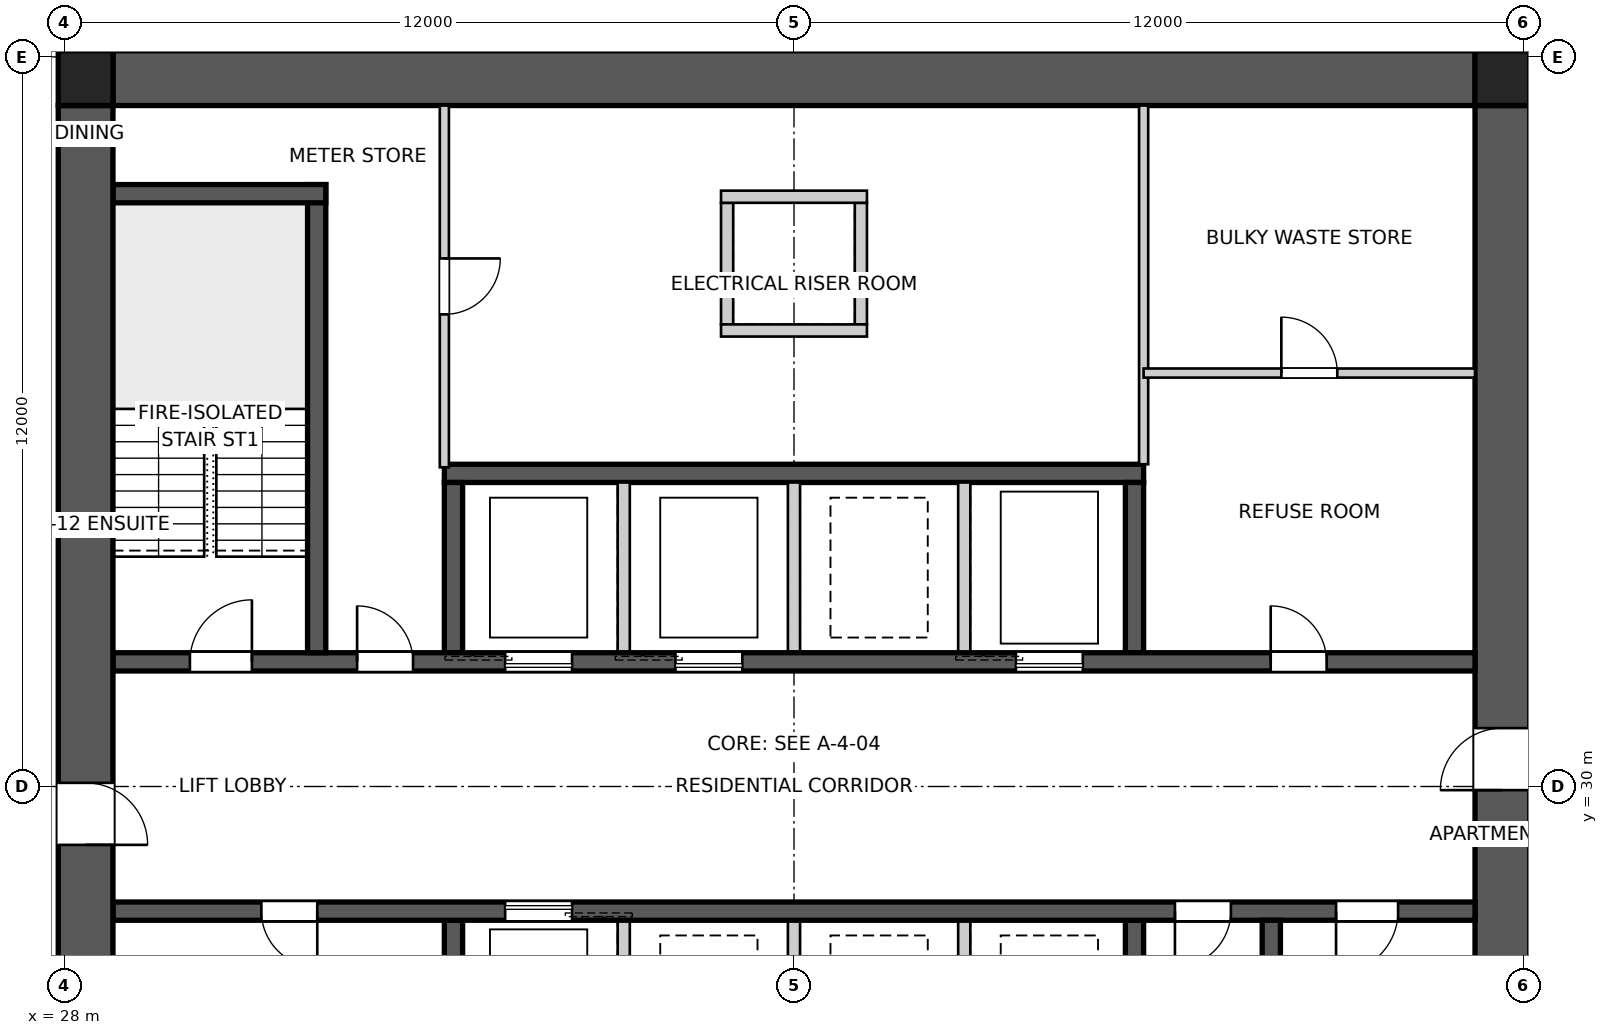
"""IFC4 building model, lengths in metres.
Left out: names, types, materials, properties, quantities, classifications, styles, units other than length and angle.
Written with IfcOpenShell. Run it as: python <this file> out.ifc"""

import sys

from ifc_helpers import new_model, si_unit, direction, frame, frame_2d, origin, origin_2d, place, context, subcontext, project, spatial, polyline, rectangle, outline, extrude, element, fill, save


model = new_model("IFC4")
c1 = context("Model", 3, precision=1e-05, world=origin(), true_north=direction((0.0, 1.0)))
c2 = subcontext(c1, "Body", "Model", "MODEL_VIEW")
j1 = project(units=[si_unit("LENGTHUNIT", "METRE"), si_unit("PLANEANGLEUNIT", "RADIAN")], contexts=[c1])
p1 = place(None, origin())
s1 = spatial("IfcSite", under=j1, at=p1, CompositionType="ELEMENT")
p2 = place(p1, origin())
s2 = spatial("IfcBuilding", under=s1, at=p2, CompositionType="ELEMENT")
p3 = place(p2, frame((0.0, 0.0, 18.4)))
s3 = spatial("IfcBuildingStorey", under=s2, at=p3, CompositionType="ELEMENT", Elevation=18.4)
p4 = place(p3, frame((28.8, 41.65, 0.0), z_axis=(0.0, 0.0, 1.0), x_axis=(1.0, 0.0, 0.0)))
e1 = element("IfcWall", 1, at=p4, inside=s3, PredefinedType="SHEAR", context=c2, shape_type="SweptSolid", body=[
    extrude(outline(polyline([(0.0, -0.45), (22.4, -0.45), (22.4, -0.025), (22.85, -0.025), (22.85, 0.025), (22.4, 0.025), (22.4, 0.45), (0.0, 0.45), (0.0, 0.025), (-0.45, 0.025), (-0.45, -0.025), (0.0, -0.025), (0.0, -0.45)])), origin(), (0.0, 0.0, 1.0), 3.4),
])
p5 = place(p3, frame((51.65, 18.8, 0.0), z_axis=(0.0, 0.0, 1.0), x_axis=(0.0, 1.0, 0.0)))
e2 = element("IfcWall", 2, at=p5, inside=s3, PredefinedType="SHEAR", context=c2, shape_type="SweptSolid", body=[
    extrude(outline(polyline([(0.0, -0.45), (22.4, -0.45), (22.4, -0.025), (22.85, -0.025), (22.85, 0.025), (22.4, 0.025), (22.4, 0.45), (0.0, 0.45), (0.0, 0.025), (-0.45, 0.025), (-0.45, -0.025), (0.0, -0.025), (0.0, -0.45)])), origin(), (0.0, 0.0, 1.0), 3.4),
])
p6 = place(p5, frame((11.14, 0.0, 0.0)))
e3 = element("IfcOpeningElement", 3, at=p6, cuts=e2, PredefinedType="OPENING", context=c2, shape_type="SweptSolid", body=[
    extrude(rectangle(XDim=1.02, YDim=2.4, at=frame_2d((0.51, 1.2))), frame((0.0, 0.46, 0.0), z_axis=(0.0, -1.0, 0.0), x_axis=(1.0, 0.0, 0.0)), (0.0, 0.0, 1.0), 0.92),
])
p7 = place(p3, frame((28.35, 41.2, 0.0), z_axis=(0.0, 0.0, 1.0), x_axis=(0.0, -1.0, 0.0)))
e4 = element("IfcWall", 4, at=p7, inside=s3, PredefinedType="SHEAR", context=c2, shape_type="SweptSolid", body=[
    extrude(outline(polyline([(0.0, -0.45), (22.4, -0.45), (22.4, -0.025), (22.85, -0.025), (22.85, 0.025), (22.4, 0.025), (22.4, 0.45), (0.0, 0.45), (0.0, 0.025), (-0.45, 0.025), (-0.45, -0.025), (0.0, -0.025), (0.0, -0.45)])), origin(), (0.0, 0.0, 1.0), 3.4),
])
p8 = place(p7, frame((11.14, 0.0, 0.0)))
e5 = element("IfcOpeningElement", 5, at=p8, cuts=e4, PredefinedType="OPENING", context=c2, shape_type="SweptSolid", body=[
    extrude(rectangle(XDim=1.02, YDim=2.4, at=frame_2d((0.51, 1.2))), frame((0.0, 0.46, 0.0), z_axis=(0.0, -1.0, 0.0), x_axis=(1.0, 0.0, 0.0)), (0.0, 0.0, 1.0), 0.92),
])
p9 = place(p3, frame((28.8, 32.05, 0.0), z_axis=(0.0, 0.0, 1.0), x_axis=(1.0, 0.0, 0.0)))
e6 = element("IfcWall", 6, at=p9, inside=s3, PredefinedType="SHEAR", context=c2, shape_type="SweptSolid", body=[
    extrude(rectangle(XDim=22.4, YDim=0.3, at=frame_2d((11.2, 0.0))), origin(), (0.0, 0.0, 1.0), 3.4),
])
p10 = place(p9, frame((19.04, 0.0, 0.0)))
e7 = element("IfcOpeningElement", 7, at=p10, cuts=e6, PredefinedType="OPENING", context=c2, shape_type="SweptSolid", body=[
    extrude(rectangle(XDim=0.92, YDim=2.1, at=frame_2d((0.46, 1.05))), frame((0.0, 0.16, 0.0), z_axis=(0.0, -1.0, 0.0), x_axis=(1.0, 0.0, 0.0)), (0.0, 0.0, 1.0), 0.32),
])
p11 = place(p9, frame((1.265, 0.0, 0.0)))
e8 = element("IfcOpeningElement", 8, at=p11, cuts=e6, PredefinedType="OPENING", context=c2, shape_type="SweptSolid", body=[
    extrude(rectangle(XDim=1.02, YDim=2.1, at=frame_2d((0.51, 1.05))), frame((0.0, 0.16, 0.0), z_axis=(0.0, -1.0, 0.0), x_axis=(1.0, 0.0, 0.0)), (0.0, 0.0, 1.0), 0.32),
])
p12 = place(p9, frame((4.015, 0.0, 0.0)))
e9 = element("IfcOpeningElement", 9, at=p12, cuts=e6, PredefinedType="OPENING", context=c2, shape_type="SweptSolid", body=[
    extrude(rectangle(XDim=0.92, YDim=2.1, at=frame_2d((0.46, 1.05))), frame((0.0, 0.16, 0.0), z_axis=(0.0, -1.0, 0.0), x_axis=(1.0, 0.0, 0.0)), (0.0, 0.0, 1.0), 0.32),
])
p13 = place(p9, frame((6.45, 0.0, 0.0)))
e10 = element("IfcOpeningElement", 10, at=p13, cuts=e6, PredefinedType="OPENING", context=c2, shape_type="SweptSolid", body=[
    extrude(rectangle(XDim=1.1, YDim=2.1, at=frame_2d((0.55, 1.05))), frame((0.0, 0.16, 0.0), z_axis=(0.0, -1.0, 0.0), x_axis=(1.0, 0.0, 0.0)), (0.0, 0.0, 1.0), 0.32),
])
p14 = place(p9, frame((9.25, 0.0, 0.0)))
e11 = element("IfcOpeningElement", 11, at=p14, cuts=e6, PredefinedType="OPENING", context=c2, shape_type="SweptSolid", body=[
    extrude(rectangle(XDim=1.1, YDim=2.1, at=frame_2d((0.55, 1.05))), frame((0.0, 0.16, 0.0), z_axis=(0.0, -1.0, 0.0), x_axis=(1.0, 0.0, 0.0)), (0.0, 0.0, 1.0), 0.32),
])
p15 = place(p9, frame((14.85, 0.0, 0.0)))
e12 = element("IfcOpeningElement", 12, at=p15, cuts=e6, PredefinedType="OPENING", context=c2, shape_type="SweptSolid", body=[
    extrude(rectangle(XDim=1.1, YDim=2.1, at=frame_2d((0.55, 1.05))), frame((0.0, 0.16, 0.0), z_axis=(0.0, -1.0, 0.0), x_axis=(1.0, 0.0, 0.0)), (0.0, 0.0, 1.0), 0.32),
])
p16 = place(p3, frame((51.2, 27.95, 0.0), z_axis=(0.0, 0.0, 1.0), x_axis=(-1.0, 0.0, 0.0)))
e13 = element("IfcWall", 13, at=p16, inside=s3, PredefinedType="SHEAR", context=c2, shape_type="SweptSolid", body=[
    extrude(rectangle(XDim=22.4, YDim=0.3, at=frame_2d((11.2, 0.0))), origin(), (0.0, 0.0, 1.0), 3.4),
])
p17 = place(p16, frame((19.04, 0.0, 0.0)))
e14 = element("IfcOpeningElement", 14, at=p17, cuts=e13, PredefinedType="OPENING", context=c2, shape_type="SweptSolid", body=[
    extrude(rectangle(XDim=0.92, YDim=2.1, at=frame_2d((0.46, 1.05))), frame((0.0, 0.16, 0.0), z_axis=(0.0, -1.0, 0.0), x_axis=(1.0, 0.0, 0.0)), (0.0, 0.0, 1.0), 0.32),
])
p18 = place(p16, frame((1.265, 0.0, 0.0)))
e15 = element("IfcOpeningElement", 15, at=p18, cuts=e13, PredefinedType="OPENING", context=c2, shape_type="SweptSolid", body=[
    extrude(rectangle(XDim=1.02, YDim=2.1, at=frame_2d((0.51, 1.05))), frame((0.0, 0.16, 0.0), z_axis=(0.0, -1.0, 0.0), x_axis=(1.0, 0.0, 0.0)), (0.0, 0.0, 1.0), 0.32),
])
p19 = place(p16, frame((4.015, 0.0, 0.0)))
e16 = element("IfcOpeningElement", 16, at=p19, cuts=e13, PredefinedType="OPENING", context=c2, shape_type="SweptSolid", body=[
    extrude(rectangle(XDim=0.92, YDim=2.1, at=frame_2d((0.46, 1.05))), frame((0.0, 0.16, 0.0), z_axis=(0.0, -1.0, 0.0), x_axis=(1.0, 0.0, 0.0)), (0.0, 0.0, 1.0), 0.32),
])
p20 = place(p16, frame((14.85, 0.0, 0.0)))
e17 = element("IfcOpeningElement", 17, at=p20, cuts=e13, PredefinedType="OPENING", context=c2, shape_type="SweptSolid", body=[
    extrude(rectangle(XDim=1.1, YDim=2.1, at=frame_2d((0.55, 1.05))), frame((0.0, 0.16, 0.0), z_axis=(0.0, -1.0, 0.0), x_axis=(1.0, 0.0, 0.0)), (0.0, 0.0, 1.0), 0.32),
])
p21 = place(p3, frame((34.25, 35.15, 0.0), z_axis=(0.0, 0.0, 1.0), x_axis=(1.0, 0.0, 0.0)))
e18 = element("IfcWall", 18, at=p21, inside=s3, PredefinedType="SHEAR", context=c2, shape_type="SweptSolid", body=[
    extrude(rectangle(XDim=11.5, YDim=0.3, at=frame_2d((5.75, 0.0))), origin(), (0.0, 0.0, 1.0), 3.4),
])
for number, where, z_axis, x_axis in (
    (19, (34.4, 32.2, 0.0), (0.0, 0.0, 1.0), (0.0, 1.0, 0.0)),
    (20, (45.6, 27.8, 0.0), (0.0, 0.0, 1.0), (0.0, -1.0, 0.0)),
):
    element("IfcWall", number, at=place(p3, frame(where, z_axis=z_axis, x_axis=x_axis)), inside=s3, PredefinedType="SHEAR", context=c2, shape_type="SweptSolid", body=[
        extrude(rectangle(XDim=2.8, YDim=0.3, at=frame_2d((1.4, 0.0))), origin(), (0.0, 0.0, 1.0), 3.4),
    ])
for number, where, z_axis, x_axis in (
    (21, (37.2, 32.2, 0.0), (0.0, 0.0, 1.0), (0.0, 1.0, 0.0)),
    (22, (42.8, 27.8, 0.0), (0.0, 0.0, 1.0), (0.0, -1.0, 0.0)),
    (23, (40.0, 32.2, 0.0), (0.0, 0.0, 1.0), (0.0, 1.0, 0.0)),
    (24, (40.0, 27.8, 0.0), (0.0, 0.0, 1.0), (0.0, -1.0, 0.0)),
    (25, (42.8, 32.2, 0.0), (0.0, 0.0, 1.0), (0.0, 1.0, 0.0)),
    (26, (37.2, 27.8, 0.0), (0.0, 0.0, 1.0), (0.0, -1.0, 0.0)),
):
    element("IfcWall", number, at=place(p3, frame(where, z_axis=z_axis, x_axis=x_axis)), inside=s3, PredefinedType="SOLIDWALL", context=c2, shape_type="SweptSolid", body=[
        extrude(rectangle(XDim=2.8, YDim=0.2, at=frame_2d((1.4, 0.0))), origin(), (0.0, 0.0, 1.0), 3.4),
    ])
for number, where, z_axis, x_axis in (
    (27, (45.6, 32.2, 0.0), (0.0, 0.0, 1.0), (0.0, 1.0, 0.0)),
    (28, (34.4, 27.8, 0.0), (0.0, 0.0, 1.0), (0.0, -1.0, 0.0)),
):
    element("IfcWall", number, at=place(p3, frame(where, z_axis=z_axis, x_axis=x_axis)), inside=s3, PredefinedType="SHEAR", context=c2, shape_type="SweptSolid", body=[
        extrude(rectangle(XDim=2.8, YDim=0.3, at=frame_2d((1.4, 0.0))), origin(), (0.0, 0.0, 1.0), 3.4),
    ])
p22 = place(p3, frame((32.15, 32.2, 0.0), z_axis=(0.0, 0.0, 1.0), x_axis=(0.0, 1.0, 0.0)))
e29 = element("IfcWall", 29, at=p22, inside=s3, PredefinedType="SHEAR", context=c2, shape_type="SweptSolid", body=[
    extrude(rectangle(XDim=7.7, YDim=0.3, at=frame_2d((3.85, 0.0))), origin(), (0.0, 0.0, 1.0), 3.4),
])
p23 = place(p3, frame((28.8, 39.75, 0.0), z_axis=(0.0, 0.0, 1.0), x_axis=(1.0, 0.0, 0.0)))
e30 = element("IfcWall", 30, at=p23, inside=s3, PredefinedType="SHEAR", context=c2, shape_type="SweptSolid", body=[
    extrude(rectangle(XDim=3.5, YDim=0.3, at=frame_2d((1.75, 0.0))), origin(), (0.0, 0.0, 1.0), 3.4),
])
p24 = place(p3, frame((47.85, 27.8, 0.0), z_axis=(0.0, 0.0, 1.0), x_axis=(0.0, -1.0, 0.0)))
e31 = element("IfcWall", 31, at=p24, inside=s3, PredefinedType="SHEAR", context=c2, shape_type="SweptSolid", body=[
    extrude(rectangle(XDim=7.7, YDim=0.3, at=frame_2d((3.85, 0.0))), origin(), (0.0, 0.0, 1.0), 3.4),
])
for number, where, z_axis, x_axis in (
    (32, (38.9, 37.6, 0.0), (0.0, 0.0, 1.0), (0.0, 1.0, 0.0)),
    (33, (41.1, 37.6, 0.0), (0.0, 0.0, 1.0), (0.0, 1.0, 0.0)),
):
    element("IfcWall", number, at=place(p3, frame(where, z_axis=z_axis, x_axis=x_axis)), inside=s3, PredefinedType="SOLIDWALL", context=c2, shape_type="SweptSolid", body=[
        extrude(rectangle(XDim=2.0, YDim=0.2, at=frame_2d((1.0, 0.0))), origin(), (0.0, 0.0, 1.0), 3.4),
    ])
for number, where, z_axis, x_axis in (
    (34, (38.8, 37.5, 0.0), (0.0, 0.0, 1.0), (1.0, 0.0, 0.0)),
    (35, (38.8, 39.7, 0.0), (0.0, 0.0, 1.0), (1.0, 0.0, 0.0)),
):
    element("IfcWall", number, at=place(p3, frame(where, z_axis=z_axis, x_axis=x_axis)), inside=s3, PredefinedType="SOLIDWALL", context=c2, shape_type="SweptSolid", body=[
        extrude(rectangle(XDim=2.4, YDim=0.2, at=frame_2d((1.2, 0.0))), origin(), (0.0, 0.0, 1.0), 3.4),
    ])
for number, where, z_axis, x_axis in (
    (36, (51.65, 41.65, 0.0), (0.0, 0.0, 1.0), (1.0, 0.0, 0.0)),
    (37, (28.35, 41.65, 0.0), (0.0, 0.0, 1.0), (1.0, 0.0, 0.0)),
):
    element("IfcColumn", number, at=place(p3, frame(where, z_axis=z_axis, x_axis=x_axis)), inside=s3, PredefinedType="COLUMN", context=c2, shape_type="SweptSolid", body=[
        extrude(rectangle(XDim=0.9, YDim=0.9, at=origin_2d()), origin(), (0.0, 0.0, 1.0), 3.4),
    ])
p25 = place(p3, frame((34.25, 41.2, 0.0), z_axis=(0.0, 0.0, 1.0), x_axis=(0.0, -1.0, 0.0)))
e38 = element("IfcWall", 38, at=p25, inside=s3, PredefinedType="SOLIDWALL", context=c2, shape_type="SweptSolid", body=[
    extrude(rectangle(XDim=5.95, YDim=0.15, at=frame_2d((2.975, 0.0))), origin(), (0.0, 0.0, 1.0), 3.25),
])
p26 = place(p25, frame((2.515, 0.0, 0.0)))
e39 = element("IfcOpeningElement", 39, at=p26, cuts=e38, PredefinedType="OPENING", context=c2, shape_type="SweptSolid", body=[
    extrude(rectangle(XDim=0.92, YDim=2.1, at=frame_2d((0.46, 1.05))), frame((0.0, 0.085, 0.0), z_axis=(0.0, -1.0, 0.0), x_axis=(1.0, 0.0, 0.0)), (0.0, 0.0, 1.0), 0.17),
])
p27 = place(p3, frame((45.75, 41.2, 0.0), z_axis=(0.0, 0.0, 1.0), x_axis=(0.0, -1.0, 0.0)))
e40 = element("IfcWall", 40, at=p27, inside=s3, PredefinedType="SOLIDWALL", context=c2, shape_type="SweptSolid", body=[
    extrude(rectangle(XDim=5.9, YDim=0.15, at=frame_2d((2.95, 0.0))), origin(), (0.0, 0.0, 1.0), 3.25),
])
p28 = place(p3, frame((45.75, 36.8, 0.0), z_axis=(0.0, 0.0, 1.0), x_axis=(1.0, 0.0, 0.0)))
e41 = element("IfcWall", 41, at=p28, inside=s3, PredefinedType="SOLIDWALL", context=c2, shape_type="SweptSolid", body=[
    extrude(rectangle(XDim=5.45, YDim=0.15, at=frame_2d((2.725, 0.0))), origin(), (0.0, 0.0, 1.0), 3.25),
])
p29 = place(p28, frame((2.265, 0.0, 0.0)))
e42 = element("IfcOpeningElement", 42, at=p29, cuts=e41, PredefinedType="OPENING", context=c2, shape_type="SweptSolid", body=[
    extrude(rectangle(XDim=0.92, YDim=2.1, at=frame_2d((0.46, 1.05))), frame((0.0, 0.085, 0.0), z_axis=(0.0, -1.0, 0.0), x_axis=(1.0, 0.0, 0.0)), (0.0, 0.0, 1.0), 0.17),
])
p30 = place(p10, origin())
e43 = element("IfcDoor", 43, at=p30, inside=s3, OperationType="SINGLE_SWING_LEFT", PredefinedType="DOOR", context=c2, shape_type="SweptSolid", body=[
    extrude(rectangle(XDim=0.92, YDim=2.1, at=frame_2d((0.46, 1.05))), frame((0.0, 0.025, 0.0), z_axis=(0.0, -1.0, 0.0), x_axis=(1.0, 0.0, 0.0)), (0.0, 0.0, 1.0), 0.05),
])
fill(e7, e43)
p31 = place(p17, origin())
e44 = element("IfcDoor", 44, at=p31, inside=s3, OperationType="SINGLE_SWING_LEFT", PredefinedType="DOOR", context=c2, shape_type="SweptSolid", body=[
    extrude(rectangle(XDim=0.92, YDim=2.1, at=frame_2d((0.46, 1.05))), frame((0.0, 0.025, 0.0), z_axis=(0.0, -1.0, 0.0), x_axis=(1.0, 0.0, 0.0)), (0.0, 0.0, 1.0), 0.05),
])
fill(e14, e44)
p32 = place(p18, origin())
e45 = element("IfcDoor", 45, at=p32, inside=s3, OperationType="SINGLE_SWING_RIGHT", PredefinedType="DOOR", context=c2, shape_type="SweptSolid", body=[
    extrude(rectangle(XDim=1.02, YDim=2.1, at=frame_2d((0.51, 1.05))), frame((0.0, 0.025, 0.0), z_axis=(0.0, -1.0, 0.0), x_axis=(1.0, 0.0, 0.0)), (0.0, 0.0, 1.0), 0.05),
])
fill(e15, e45)
p33 = place(p11, origin())
e46 = element("IfcDoor", 46, at=p33, inside=s3, OperationType="SINGLE_SWING_RIGHT", PredefinedType="DOOR", context=c2, shape_type="SweptSolid", body=[
    extrude(rectangle(XDim=1.02, YDim=2.1, at=frame_2d((0.51, 1.05))), frame((0.0, 0.025, 0.0), z_axis=(0.0, -1.0, 0.0), x_axis=(1.0, 0.0, 0.0)), (0.0, 0.0, 1.0), 0.05),
])
fill(e8, e46)
p34 = place(p12, origin())
e47 = element("IfcDoor", 47, at=p34, inside=s3, OperationType="SINGLE_SWING_LEFT", PredefinedType="DOOR", context=c2, shape_type="SweptSolid", body=[
    extrude(rectangle(XDim=0.92, YDim=2.1, at=frame_2d((0.46, 1.05))), frame((0.0, 0.025, 0.0), z_axis=(0.0, -1.0, 0.0), x_axis=(1.0, 0.0, 0.0)), (0.0, 0.0, 1.0), 0.05),
])
fill(e9, e47)
p35 = place(p19, origin())
e48 = element("IfcDoor", 48, at=p35, inside=s3, OperationType="SINGLE_SWING_RIGHT", PredefinedType="DOOR", context=c2, shape_type="SweptSolid", body=[
    extrude(rectangle(XDim=0.92, YDim=2.1, at=frame_2d((0.46, 1.05))), frame((0.0, 0.025, 0.0), z_axis=(0.0, -1.0, 0.0), x_axis=(1.0, 0.0, 0.0)), (0.0, 0.0, 1.0), 0.05),
])
fill(e16, e48)
p36 = place(p29, origin())
e49 = element("IfcDoor", 49, at=p36, inside=s3, OperationType="SINGLE_SWING_LEFT", PredefinedType="DOOR", context=c2, shape_type="SweptSolid", body=[
    extrude(rectangle(XDim=0.92, YDim=2.1, at=frame_2d((0.46, 1.05))), frame((0.0, 0.025, 0.0), z_axis=(0.0, -1.0, 0.0), x_axis=(1.0, 0.0, 0.0)), (0.0, 0.0, 1.0), 0.05),
])
fill(e42, e49)
p37 = place(p26, origin())
e50 = element("IfcDoor", 50, at=p37, inside=s3, OperationType="SINGLE_SWING_LEFT", PredefinedType="DOOR", context=c2, shape_type="SweptSolid", body=[
    extrude(rectangle(XDim=0.92, YDim=2.1, at=frame_2d((0.46, 1.05))), frame((0.0, 0.025, 0.0), z_axis=(0.0, -1.0, 0.0), x_axis=(1.0, 0.0, 0.0)), (0.0, 0.0, 1.0), 0.05),
])
fill(e39, e50)
p38 = place(p6, origin())
e51 = element("IfcDoor", 51, at=p38, inside=s3, OperationType="SINGLE_SWING_LEFT", PredefinedType="DOOR", context=c2, shape_type="SweptSolid", body=[
    extrude(rectangle(XDim=1.02, YDim=2.4, at=frame_2d((0.51, 1.2))), frame((0.0, 0.025, 0.0), z_axis=(0.0, -1.0, 0.0), x_axis=(1.0, 0.0, 0.0)), (0.0, 0.0, 1.0), 0.05),
])
fill(e3, e51)
p39 = place(p8, origin())
e52 = element("IfcDoor", 52, at=p39, inside=s3, OperationType="SINGLE_SWING_RIGHT", PredefinedType="DOOR", context=c2, shape_type="SweptSolid", body=[
    extrude(rectangle(XDim=1.02, YDim=2.4, at=frame_2d((0.51, 1.2))), frame((0.0, 0.025, 0.0), z_axis=(0.0, -1.0, 0.0), x_axis=(1.0, 0.0, 0.0)), (0.0, 0.0, 1.0), 0.05),
])
fill(e5, e52)
p40 = place(p13, origin())
e53 = element("IfcDoor", 53, at=p40, inside=s3, OperationType="SLIDING_TO_LEFT", PredefinedType="DOOR", context=c2, shape_type="SweptSolid", body=[
    extrude(rectangle(XDim=1.1, YDim=2.1, at=frame_2d((0.55, 1.05))), frame((0.0, 0.025, 0.0), z_axis=(0.0, -1.0, 0.0), x_axis=(1.0, 0.0, 0.0)), (0.0, 0.0, 1.0), 0.05),
])
fill(e10, e53)
p41 = place(p14, origin())
e54 = element("IfcDoor", 54, at=p41, inside=s3, OperationType="SLIDING_TO_LEFT", PredefinedType="DOOR", context=c2, shape_type="SweptSolid", body=[
    extrude(rectangle(XDim=1.1, YDim=2.1, at=frame_2d((0.55, 1.05))), frame((0.0, 0.025, 0.0), z_axis=(0.0, -1.0, 0.0), x_axis=(1.0, 0.0, 0.0)), (0.0, 0.0, 1.0), 0.05),
])
fill(e11, e54)
p42 = place(p15, origin())
e55 = element("IfcDoor", 55, at=p42, inside=s3, OperationType="SLIDING_TO_LEFT", PredefinedType="DOOR", context=c2, shape_type="SweptSolid", body=[
    extrude(rectangle(XDim=1.1, YDim=2.1, at=frame_2d((0.55, 1.05))), frame((0.0, 0.025, 0.0), z_axis=(0.0, -1.0, 0.0), x_axis=(1.0, 0.0, 0.0)), (0.0, 0.0, 1.0), 0.05),
])
fill(e12, e55)
p43 = place(p20, origin())
e56 = element("IfcDoor", 56, at=p43, inside=s3, OperationType="SLIDING_TO_LEFT", PredefinedType="DOOR", context=c2, shape_type="SweptSolid", body=[
    extrude(rectangle(XDim=1.1, YDim=2.1, at=frame_2d((0.55, 1.05))), frame((0.0, 0.025, 0.0), z_axis=(0.0, -1.0, 0.0), x_axis=(1.0, 0.0, 0.0)), (0.0, 0.0, 1.0), 0.05),
])
fill(e17, e56)
save(model, sys.argv[1])
